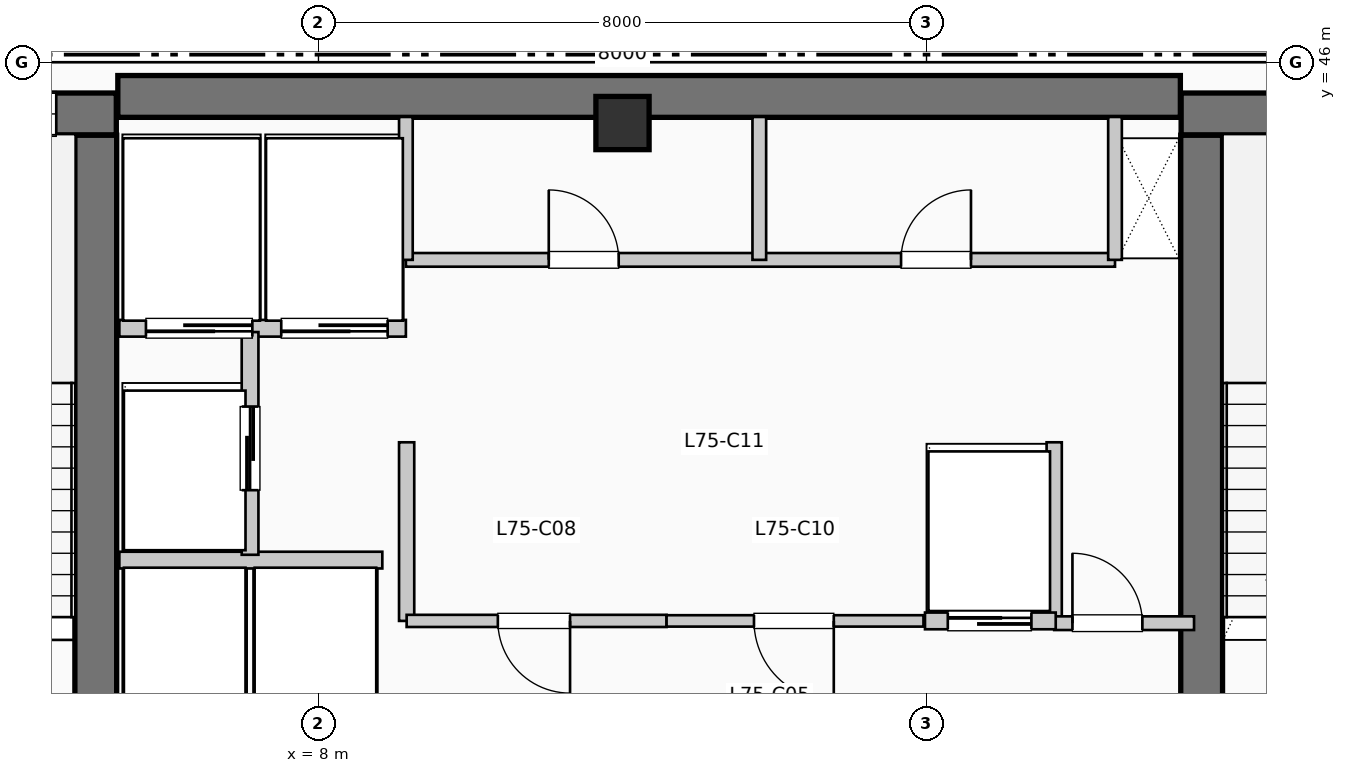
"""IFC4 building model, lengths in metres.
Left out: names, types, materials, properties, quantities, classifications, styles, units other than length and angle.
Written with IfcOpenShell. Run it as: python <this file> out.ifc"""

import sys

from ifc_helpers import new_model, si_unit, direction, frame, frame_2d, origin, origin_2d, place, context, subcontext, project, spatial, rectangle, extrude, element, fill, save


model = new_model("IFC4")
c1 = context("Model", 3, precision=1e-05, world=origin(), true_north=direction((0.0, 1.0)))
c2 = subcontext(c1, "Body", "Model", "MODEL_VIEW")
j1 = project(units=[si_unit("LENGTHUNIT", "METRE"), si_unit("PLANEANGLEUNIT", "RADIAN")], contexts=[c1])
p1 = place(None, origin())
s1 = spatial("IfcSite", under=j1, at=p1, CompositionType="ELEMENT")
p2 = place(p1, origin())
s2 = spatial("IfcBuilding", under=s1, at=p2, CompositionType="ELEMENT")
p3 = place(p2, frame((0.0, 0.0, 307.89)))
s3 = spatial("IfcBuildingStorey", under=s2, at=p3, CompositionType="ELEMENT", Elevation=307.89)
p4 = place(p3, frame((5.36, 45.55, 0.0), z_axis=(0.0, 0.0, 1.0), x_axis=(1.0, 0.0, 0.0)))
e1 = element("IfcWall", 1, at=p4, inside=s3, PredefinedType="SHEAR", context=c2, shape_type="SweptSolid", body=[
    extrude(rectangle(XDim=13.98, YDim=0.55, at=frame_2d((6.99, 0.0))), origin(), (0.0, 0.0, 1.0), 3.96),
])
p5 = place(p3, frame((5.07, 37.15, 0.0), z_axis=(0.0, 0.0, 1.0), x_axis=(0.0, 1.0, 0.0)))
e2 = element("IfcWall", 2, at=p5, inside=s3, PredefinedType="SHEAR", context=c2, shape_type="SweptSolid", body=[
    extrude(rectangle(XDim=7.89, YDim=0.55, at=frame_2d((3.945, 0.0))), origin(), (0.0, 0.0, 1.0), 3.96),
])
p6 = place(p3, frame((1.1, 45.32, 0.0), z_axis=(0.0, 0.0, 1.0), x_axis=(1.0, 0.0, 0.0)))
e3 = element("IfcWall", 3, at=p6, inside=s3, PredefinedType="SHEAR", context=c2, shape_type="SweptSolid", body=[
    extrude(rectangle(XDim=4.24, YDim=0.55, at=frame_2d((2.12, 0.0))), origin(), (0.0, 0.0, 1.0), 3.96),
])
p7 = place(p6, frame((2.05, 0.0, 1.05)))
e4 = element("IfcOpeningElement", 4, at=p7, cuts=e3, PredefinedType="OPENING", context=c2, shape_type="SweptSolid", body=[
    extrude(rectangle(XDim=1.4, YDim=1.8, at=frame_2d((0.7, 0.9))), frame((0.0, 0.285, 0.0), z_axis=(0.0, -1.0, 0.0), x_axis=(1.0, 0.0, 0.0)), (0.0, 0.0, 1.0), 0.57),
])
p8 = place(p3, frame((19.62, 37.15, 0.0), z_axis=(0.0, 0.0, 1.0), x_axis=(0.0, 1.0, 0.0)))
e5 = element("IfcWall", 5, at=p8, inside=s3, PredefinedType="SHEAR", context=c2, shape_type="SweptSolid", body=[
    extrude(rectangle(XDim=7.89, YDim=0.55, at=frame_2d((3.945, 0.0))), origin(), (0.0, 0.0, 1.0), 3.96),
])
p9 = place(p3, frame((19.35, 45.32, 0.0), z_axis=(0.0, 0.0, 1.0), x_axis=(1.0, 0.0, 0.0)))
e6 = element("IfcWall", 6, at=p9, inside=s3, PredefinedType="SHEAR", context=c2, shape_type="SweptSolid", body=[
    extrude(rectangle(XDim=3.69, YDim=0.55, at=frame_2d((1.845, 0.0))), origin(), (0.0, 0.0, 1.0), 3.96),
])
p10 = place(p9, frame((1.15, 0.0, 1.05)))
e7 = element("IfcOpeningElement", 7, at=p10, cuts=e6, PredefinedType="OPENING", context=c2, shape_type="SweptSolid", body=[
    extrude(rectangle(XDim=1.4, YDim=1.8, at=frame_2d((0.7, 0.9))), frame((0.0, 0.285, 0.0), z_axis=(0.0, -1.0, 0.0), x_axis=(1.0, 0.0, 0.0)), (0.0, 0.0, 1.0), 0.57),
])
p11 = place(p3, frame((12.0, 45.2, 0.0), z_axis=(0.0, 0.0, 1.0), x_axis=(1.0, 0.0, 0.0)))
e8 = element("IfcColumn", 8, at=p11, inside=s3, PredefinedType="COLUMN", context=c2, shape_type="SweptSolid", body=[
    extrude(rectangle(XDim=0.7, YDim=0.7, at=origin_2d()), origin(), (0.0, 0.0, 1.0), 3.96),
])
p12 = place(p3, frame((5.38, 39.45, 0.0), z_axis=(0.0, 0.0, 1.0), x_axis=(1.0, 0.0, 0.0)))
e9 = element("IfcWall", 9, at=p12, inside=s3, PredefinedType="PARTITIONING", context=c2, shape_type="SweptSolid", body=[
    extrude(rectangle(XDim=3.46, YDim=0.22, at=frame_2d((1.73, 0.0))), origin(), (0.0, 0.0, 1.0), 3.74),
])
p13 = place(p3, frame((5.38, 42.5, 0.0), z_axis=(0.0, 0.0, 1.0), x_axis=(1.0, 0.0, 0.0)))
e10 = element("IfcWall", 10, at=p13, inside=s3, PredefinedType="PARTITIONING", context=c2, shape_type="SweptSolid", body=[
    extrude(rectangle(XDim=3.77, YDim=0.22, at=frame_2d((1.885, 0.0))), origin(), (0.0, 0.0, 1.0), 3.74),
])
p14 = place(p13, frame((1.75, 0.0, 0.0), z_axis=(0.0, 0.0, 1.0), x_axis=(-1.0, 0.0, 0.0)))
e11 = element("IfcOpeningElement", 11, at=p14, cuts=e10, PredefinedType="OPENING", context=c2, shape_type="SweptSolid", body=[
    extrude(rectangle(XDim=1.4, YDim=2.2, at=frame_2d((0.7, 1.1))), frame((0.0, 0.12, 0.0), z_axis=(0.0, -1.0, 0.0), x_axis=(1.0, 0.0, 0.0)), (0.0, 0.0, 1.0), 0.24),
])
p15 = place(p13, frame((3.53, 0.0, 0.0), z_axis=(0.0, 0.0, 1.0), x_axis=(-1.0, 0.0, 0.0)))
e12 = element("IfcOpeningElement", 12, at=p15, cuts=e10, PredefinedType="OPENING", context=c2, shape_type="SweptSolid", body=[
    extrude(rectangle(XDim=1.4, YDim=2.2, at=frame_2d((0.7, 1.1))), frame((0.0, 0.12, 0.0), z_axis=(0.0, -1.0, 0.0), x_axis=(1.0, 0.0, 0.0)), (0.0, 0.0, 1.0), 0.24),
])
p16 = place(p3, frame((7.1, 39.52, 0.0), z_axis=(0.0, 0.0, 1.0), x_axis=(0.0, 1.0, 0.0)))
e13 = element("IfcWall", 13, at=p16, inside=s3, PredefinedType="PARTITIONING", context=c2, shape_type="SweptSolid", body=[
    extrude(rectangle(XDim=2.93, YDim=0.22, at=frame_2d((1.465, 0.0))), origin(), (0.0, 0.0, 1.0), 3.74),
])
p17 = place(p16, frame((0.85, 0.0, 0.0)))
e14 = element("IfcOpeningElement", 14, at=p17, cuts=e13, PredefinedType="OPENING", context=c2, shape_type="SweptSolid", body=[
    extrude(rectangle(XDim=1.1, YDim=2.2, at=frame_2d((0.55, 1.1))), frame((0.0, 0.12, 0.0), z_axis=(0.0, -1.0, 0.0), x_axis=(1.0, 0.0, 0.0)), (0.0, 0.0, 1.0), 0.24),
])
for number, where, z_axis, x_axis in (
    (15, (9.16, 38.65, 0.0), (0.0, 0.0, 1.0), (0.0, 1.0, 0.0)),
    (16, (17.68, 38.65, 0.0), (0.0, 0.0, 1.0), (0.0, 1.0, 0.0)),
):
    element("IfcWall", number, at=place(p3, frame(where, z_axis=z_axis, x_axis=x_axis)), inside=s3, PredefinedType="PARTITIONING", context=c2, shape_type="SweptSolid", body=[
        extrude(rectangle(XDim=2.35, YDim=0.2, at=frame_2d((1.175, 0.0))), origin(), (0.0, 0.0, 1.0), 3.74),
    ])
p18 = place(p3, frame((17.68, 38.62, 0.0), z_axis=(0.0, 0.0, 1.0), x_axis=(1.0, 0.0, 0.0)))
e17 = element("IfcWall", 17, at=p18, inside=s3, PredefinedType="PARTITIONING", context=c2, shape_type="SweptSolid", body=[
    extrude(rectangle(XDim=1.84, YDim=0.18, at=frame_2d((0.92, 0.0))), origin(), (0.0, 0.0, 1.0), 3.74),
])
p19 = place(p18, frame((0.24, 0.0, 0.0)))
e18 = element("IfcOpeningElement", 18, at=p19, cuts=e17, PredefinedType="OPENING", context=c2, shape_type="SweptSolid", body=[
    extrude(rectangle(XDim=0.92, YDim=2.1, at=frame_2d((0.46, 1.05))), frame((0.0, 0.1, 0.0), z_axis=(0.0, -1.0, 0.0), x_axis=(1.0, 0.0, 0.0)), (0.0, 0.0, 1.0), 0.2),
])
p20 = place(p3, frame((9.16, 38.65, 0.0), z_axis=(0.0, 0.0, 1.0), x_axis=(1.0, 0.0, 0.0)))
e19 = element("IfcWall", 19, at=p20, inside=s3, PredefinedType="PARTITIONING", context=c2, shape_type="SweptSolid", body=[
    extrude(rectangle(XDim=3.42, YDim=0.16, at=frame_2d((1.71, 0.0))), origin(), (0.0, 0.0, 1.0), 3.74),
])
p21 = place(p20, frame((2.15, 0.0, 0.0), z_axis=(0.0, 0.0, 1.0), x_axis=(-1.0, 0.0, 0.0)))
e20 = element("IfcOpeningElement", 20, at=p21, cuts=e19, PredefinedType="OPENING", context=c2, shape_type="SweptSolid", body=[
    extrude(rectangle(XDim=0.95, YDim=2.15, at=frame_2d((0.475, 1.075))), frame((0.0, 0.09, 0.0), z_axis=(0.0, -1.0, 0.0), x_axis=(1.0, 0.0, 0.0)), (0.0, 0.0, 1.0), 0.18),
])
p22 = place(p3, frame((12.58, 38.65, 0.0), z_axis=(0.0, 0.0, 1.0), x_axis=(1.0, 0.0, 0.0)))
e21 = element("IfcWall", 21, at=p22, inside=s3, PredefinedType="PARTITIONING", context=c2, shape_type="SweptSolid", body=[
    extrude(rectangle(XDim=3.38, YDim=0.15, at=frame_2d((1.69, 0.0))), origin(), (0.0, 0.0, 1.0), 3.74),
])
p23 = place(p22, frame((2.2, 0.0, 0.0), z_axis=(0.0, 0.0, 1.0), x_axis=(-1.0, 0.0, 0.0)))
e22 = element("IfcOpeningElement", 22, at=p23, cuts=e21, PredefinedType="OPENING", context=c2, shape_type="SweptSolid", body=[
    extrude(rectangle(XDim=1.05, YDim=2.15, at=frame_2d((0.525, 1.075))), frame((0.0, 0.085, 0.0), z_axis=(0.0, -1.0, 0.0), x_axis=(1.0, 0.0, 0.0)), (0.0, 0.0, 1.0), 0.17),
])
p24 = place(p3, frame((15.98, 38.65, 0.0), z_axis=(0.0, 0.0, 1.0), x_axis=(1.0, 0.0, 0.0)))
e23 = element("IfcWall", 23, at=p24, inside=s3, PredefinedType="PARTITIONING", context=c2, shape_type="SweptSolid", body=[
    extrude(rectangle(XDim=1.72, YDim=0.22, at=frame_2d((0.86, 0.0))), origin(), (0.0, 0.0, 1.0), 3.74),
])
p25 = place(p24, frame((0.3, 0.0, 0.0)))
e24 = element("IfcOpeningElement", 24, at=p25, cuts=e23, PredefinedType="OPENING", context=c2, shape_type="SweptSolid", body=[
    extrude(rectangle(XDim=1.1, YDim=2.2, at=frame_2d((0.55, 1.1))), frame((0.0, 0.12, 0.0), z_axis=(0.0, -1.0, 0.0), x_axis=(1.0, 0.0, 0.0)), (0.0, 0.0, 1.0), 0.24),
])
p26 = place(p3, frame((9.15, 43.4, 0.0), z_axis=(0.0, 0.0, 1.0), x_axis=(1.0, 0.0, 0.0)))
e25 = element("IfcWall", 25, at=p26, inside=s3, PredefinedType="PLUMBINGWALL", context=c2, shape_type="SweptSolid", body=[
    extrude(rectangle(XDim=9.33, YDim=0.18, at=frame_2d((4.665, 0.0))), origin(), (0.0, 0.0, 1.0), 3.74),
])
p27 = place(p26, frame((1.88, 0.0, 0.0)))
e26 = element("IfcOpeningElement", 26, at=p27, cuts=e25, PredefinedType="OPENING", context=c2, shape_type="SweptSolid", body=[
    extrude(rectangle(XDim=0.92, YDim=2.1, at=frame_2d((0.46, 1.05))), frame((0.0, 0.1, 0.0), z_axis=(0.0, -1.0, 0.0), x_axis=(1.0, 0.0, 0.0)), (0.0, 0.0, 1.0), 0.2),
])
p28 = place(p26, frame((6.515, 0.0, 0.0)))
e27 = element("IfcOpeningElement", 27, at=p28, cuts=e25, PredefinedType="OPENING", context=c2, shape_type="SweptSolid", body=[
    extrude(rectangle(XDim=0.92, YDim=2.1, at=frame_2d((0.46, 1.05))), frame((0.0, 0.1, 0.0), z_axis=(0.0, -1.0, 0.0), x_axis=(1.0, 0.0, 0.0)), (0.0, 0.0, 1.0), 0.2),
])
for number, where, z_axis, x_axis in (
    (28, (9.15, 43.4, 0.0), (0.0, 0.0, 1.0), (0.0, 1.0, 0.0)),
    (29, (18.48, 43.4, 0.0), (0.0, 0.0, 1.0), (0.0, 1.0, 0.0)),
    (30, (13.8, 43.4, 0.0), (0.0, 0.0, 1.0), (0.0, 1.0, 0.0)),
):
    element("IfcWall", number, at=place(p3, frame(where, z_axis=z_axis, x_axis=x_axis)), inside=s3, PredefinedType="PLUMBINGWALL", context=c2, shape_type="SweptSolid", body=[
        extrude(rectangle(XDim=1.88, YDim=0.18, at=frame_2d((0.94, 0.0))), origin(), (0.0, 0.0, 1.0), 3.74),
    ])
p29 = place(p7, origin())
e31 = element("IfcWindow", 31, at=p29, inside=s3, PartitioningType="SINGLE_PANEL", PredefinedType="WINDOW", context=c2, shape_type="SweptSolid", body=[
    extrude(rectangle(XDim=1.4, YDim=1.8, at=frame_2d((0.7, 0.9))), frame((0.0, 0.03, 0.0), z_axis=(0.0, -1.0, 0.0), x_axis=(1.0, 0.0, 0.0)), (0.0, 0.0, 1.0), 0.06),
])
fill(e4, e31)
p30 = place(p14, origin())
e32 = element("IfcDoor", 32, at=p30, inside=s3, OperationType="SLIDING_TO_LEFT", PredefinedType="DOOR", context=c2, shape_type="SweptSolid", body=[
    extrude(rectangle(XDim=1.4, YDim=2.2, at=frame_2d((0.7, 1.1))), frame((0.0, 0.025, 0.0), z_axis=(0.0, -1.0, 0.0), x_axis=(1.0, 0.0, 0.0)), (0.0, 0.0, 1.0), 0.05),
])
fill(e11, e32)
p31 = place(p15, origin())
e33 = element("IfcDoor", 33, at=p31, inside=s3, OperationType="SLIDING_TO_LEFT", PredefinedType="DOOR", context=c2, shape_type="SweptSolid", body=[
    extrude(rectangle(XDim=1.4, YDim=2.2, at=frame_2d((0.7, 1.1))), frame((0.0, 0.025, 0.0), z_axis=(0.0, -1.0, 0.0), x_axis=(1.0, 0.0, 0.0)), (0.0, 0.0, 1.0), 0.05),
])
fill(e12, e33)
p32 = place(p17, origin())
e34 = element("IfcDoor", 34, at=p32, inside=s3, OperationType="SLIDING_TO_LEFT", PredefinedType="DOOR", context=c2, shape_type="SweptSolid", body=[
    extrude(rectangle(XDim=1.1, YDim=2.2, at=frame_2d((0.55, 1.1))), frame((0.0, 0.025, 0.0), z_axis=(0.0, -1.0, 0.0), x_axis=(1.0, 0.0, 0.0)), (0.0, 0.0, 1.0), 0.05),
])
fill(e14, e34)
p33 = place(p19, origin())
e35 = element("IfcDoor", 35, at=p33, inside=s3, OperationType="SINGLE_SWING_LEFT", PredefinedType="DOOR", context=c2, shape_type="SweptSolid", body=[
    extrude(rectangle(XDim=0.92, YDim=2.1, at=frame_2d((0.46, 1.05))), frame((0.0, 0.025, 0.0), z_axis=(0.0, -1.0, 0.0), x_axis=(1.0, 0.0, 0.0)), (0.0, 0.0, 1.0), 0.05),
])
fill(e18, e35)
p34 = place(p21, origin())
e36 = element("IfcDoor", 36, at=p34, inside=s3, OperationType="SINGLE_SWING_RIGHT", PredefinedType="DOOR", context=c2, shape_type="SweptSolid", body=[
    extrude(rectangle(XDim=0.95, YDim=2.15, at=frame_2d((0.475, 1.075))), frame((0.0, 0.025, 0.0), z_axis=(0.0, -1.0, 0.0), x_axis=(1.0, 0.0, 0.0)), (0.0, 0.0, 1.0), 0.05),
])
fill(e20, e36)
p35 = place(p23, origin())
e37 = element("IfcDoor", 37, at=p35, inside=s3, OperationType="SINGLE_SWING_RIGHT", PredefinedType="DOOR", context=c2, shape_type="SweptSolid", body=[
    extrude(rectangle(XDim=1.05, YDim=2.15, at=frame_2d((0.525, 1.075))), frame((0.0, 0.025, 0.0), z_axis=(0.0, -1.0, 0.0), x_axis=(1.0, 0.0, 0.0)), (0.0, 0.0, 1.0), 0.05),
])
fill(e22, e37)
p36 = place(p25, origin())
e38 = element("IfcDoor", 38, at=p36, inside=s3, OperationType="SLIDING_TO_LEFT", PredefinedType="DOOR", context=c2, shape_type="SweptSolid", body=[
    extrude(rectangle(XDim=1.1, YDim=2.2, at=frame_2d((0.55, 1.1))), frame((0.0, 0.025, 0.0), z_axis=(0.0, -1.0, 0.0), x_axis=(1.0, 0.0, 0.0)), (0.0, 0.0, 1.0), 0.05),
])
fill(e24, e38)
p37 = place(p27, origin())
e39 = element("IfcDoor", 39, at=p37, inside=s3, OperationType="SINGLE_SWING_LEFT", PredefinedType="DOOR", context=c2, shape_type="SweptSolid", body=[
    extrude(rectangle(XDim=0.92, YDim=2.1, at=frame_2d((0.46, 1.05))), frame((0.0, 0.025, 0.0), z_axis=(0.0, -1.0, 0.0), x_axis=(1.0, 0.0, 0.0)), (0.0, 0.0, 1.0), 0.05),
])
fill(e26, e39)
p38 = place(p28, origin())
e40 = element("IfcDoor", 40, at=p38, inside=s3, OperationType="SINGLE_SWING_RIGHT", PredefinedType="DOOR", context=c2, shape_type="SweptSolid", body=[
    extrude(rectangle(XDim=0.92, YDim=2.1, at=frame_2d((0.46, 1.05))), frame((0.0, 0.025, 0.0), z_axis=(0.0, -1.0, 0.0), x_axis=(1.0, 0.0, 0.0)), (0.0, 0.0, 1.0), 0.05),
])
fill(e27, e40)
save(model, sys.argv[1])
